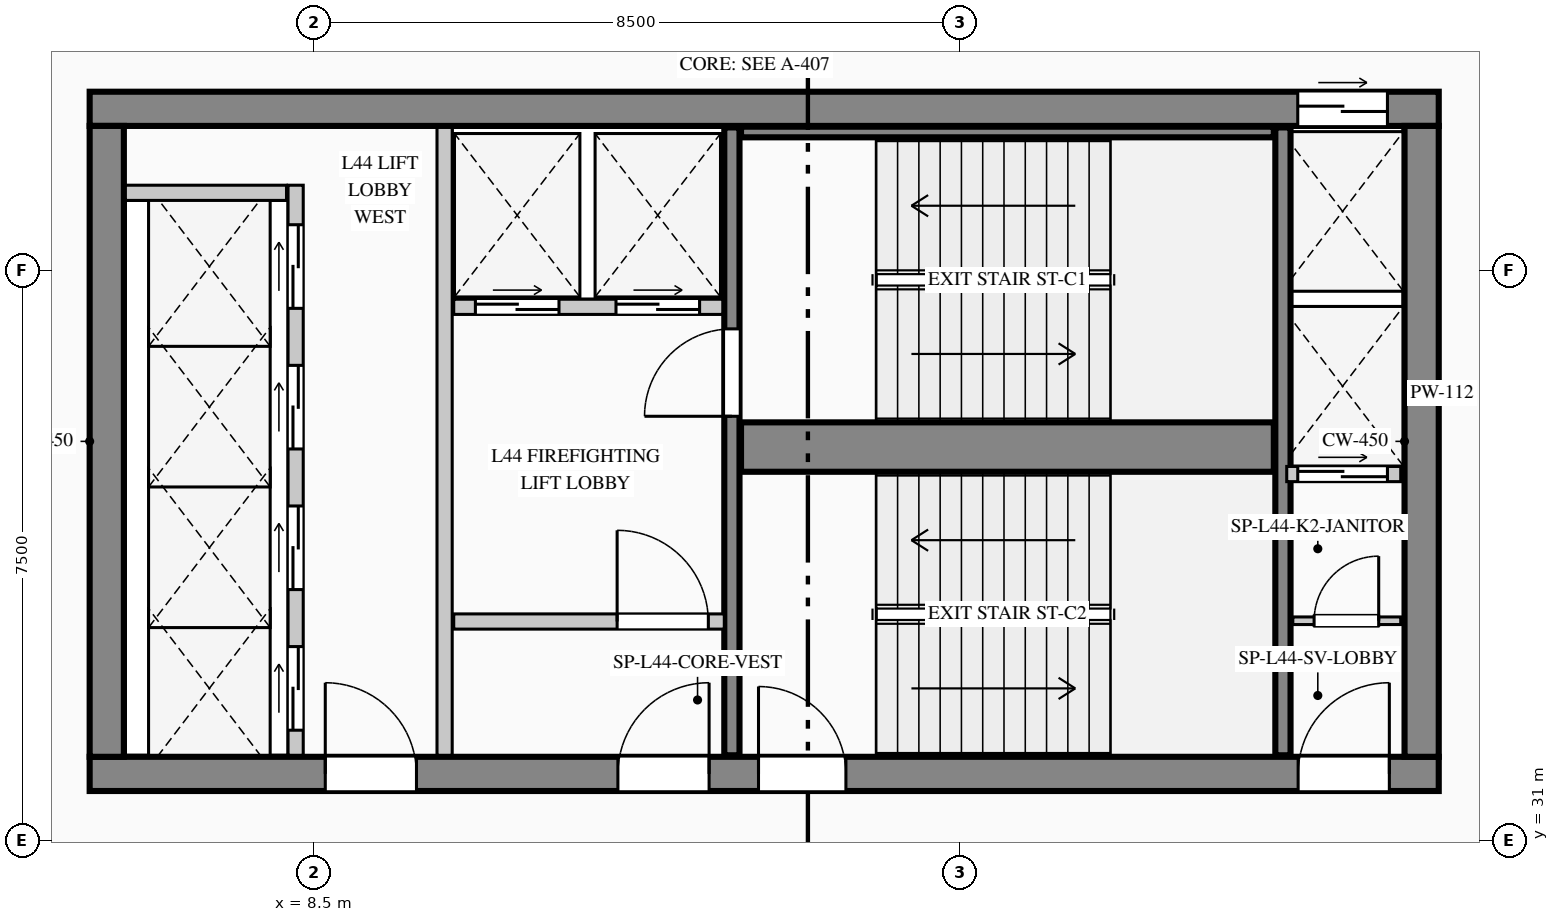
"""IFC4 building model, lengths in metres.
Left out: names, types, materials, properties, quantities, classifications, styles, units other than length and angle.
Written with IfcOpenShell. Run it as: python <this file> out.ifc"""

import sys

from ifc_helpers import new_model, si_unit, direction, frame, frame_2d, origin, place, context, subcontext, project, spatial, rectangle, extrude, element, fill, save


model = new_model("IFC4")
c1 = context("Model", 3, precision=1e-05, world=origin(), true_north=direction((0.0, 1.0)))
c2 = subcontext(c1, "Body", "Model", "MODEL_VIEW")
j1 = project(units=[si_unit("LENGTHUNIT", "METRE"), si_unit("PLANEANGLEUNIT", "RADIAN")], contexts=[c1])
p1 = place(None, origin())
s1 = spatial("IfcSite", under=j1, at=p1, CompositionType="ELEMENT")
p2 = place(p1, origin())
s2 = spatial("IfcBuilding", under=s1, at=p2, CompositionType="ELEMENT")
p3 = place(p2, frame((0.0, 0.0, 187.7)))
s3 = spatial("IfcBuildingStorey", under=s2, at=p3, CompositionType="ELEMENT", Elevation=187.7)
p4 = place(p3, frame((5.55, 40.625, 0.0), z_axis=(0.0, 0.0, 1.0), x_axis=(1.0, 0.0, 0.0)))
e1 = element("IfcWall", 1, at=p4, inside=s3, PredefinedType="SHEAR", context=c2, shape_type="SweptSolid", body=[
    extrude(rectangle(XDim=17.75, YDim=0.45, at=frame_2d((8.875, 0.0))), origin(), (0.0, 0.0, 1.0), 3.95),
])
p5 = place(p4, frame((15.895, 0.0, 0.0)))
e2 = element("IfcOpeningElement", 2, at=p5, cuts=e1, PredefinedType="OPENING", context=c2, shape_type="SweptSolid", body=[
    extrude(rectangle(XDim=1.18, YDim=2.25, at=frame_2d((0.59, 1.125))), frame((0.0, 0.235, 0.0), z_axis=(0.0, -1.0, 0.0), x_axis=(1.0, 0.0, 0.0)), (0.0, 0.0, 1.0), 0.47),
])
p6 = place(p3, frame((5.55, 31.875, 0.0), z_axis=(0.0, 0.0, 1.0), x_axis=(1.0, 0.0, 0.0)))
e3 = element("IfcWall", 3, at=p6, inside=s3, PredefinedType="SHEAR", context=c2, shape_type="SweptSolid", body=[
    extrude(rectangle(XDim=17.75, YDim=0.45, at=frame_2d((8.875, 0.0))), origin(), (0.0, 0.0, 1.0), 3.95),
])
p7 = place(p6, frame((3.1, 0.0, 0.0)))
e4 = element("IfcOpeningElement", 4, at=p7, cuts=e3, PredefinedType="OPENING", context=c2, shape_type="SweptSolid", body=[
    extrude(rectangle(XDim=1.2, YDim=2.2, at=frame_2d((0.6, 1.1))), frame((0.0, 0.235, 0.0), z_axis=(0.0, -1.0, 0.0), x_axis=(1.0, 0.0, 0.0)), (0.0, 0.0, 1.0), 0.47),
])
p8 = place(p6, frame((6.95, 0.0, 0.0)))
e5 = element("IfcOpeningElement", 5, at=p8, cuts=e3, PredefinedType="OPENING", context=c2, shape_type="SweptSolid", body=[
    extrude(rectangle(XDim=1.2, YDim=2.2, at=frame_2d((0.6, 1.1))), frame((0.0, 0.235, 0.0), z_axis=(0.0, -1.0, 0.0), x_axis=(1.0, 0.0, 0.0)), (0.0, 0.0, 1.0), 0.47),
])
p9 = place(p6, frame((8.8, 0.0, 0.0)))
e6 = element("IfcOpeningElement", 6, at=p9, cuts=e3, PredefinedType="OPENING", context=c2, shape_type="SweptSolid", body=[
    extrude(rectangle(XDim=1.15, YDim=2.2, at=frame_2d((0.575, 1.1))), frame((0.0, 0.235, 0.0), z_axis=(0.0, -1.0, 0.0), x_axis=(1.0, 0.0, 0.0)), (0.0, 0.0, 1.0), 0.47),
])
p10 = place(p6, frame((15.9, 0.0, 0.0)))
e7 = element("IfcOpeningElement", 7, at=p10, cuts=e3, PredefinedType="OPENING", context=c2, shape_type="SweptSolid", body=[
    extrude(rectangle(XDim=1.2, YDim=2.2, at=frame_2d((0.6, 1.1))), frame((0.0, 0.235, 0.0), z_axis=(0.0, -1.0, 0.0), x_axis=(1.0, 0.0, 0.0)), (0.0, 0.0, 1.0), 0.47),
])
for number, where, z_axis, x_axis in (
    (8, (5.775, 32.1, 0.0), (0.0, 0.0, 1.0), (0.0, 1.0, 0.0)),
    (9, (23.075, 32.1, 0.0), (0.0, 0.0, 1.0), (0.0, 1.0, 0.0)),
):
    element("IfcWall", number, at=place(p3, frame(where, z_axis=z_axis, x_axis=x_axis)), inside=s3, PredefinedType="SHEAR", context=c2, shape_type="SweptSolid", body=[
        extrude(rectangle(XDim=8.3, YDim=0.45, at=frame_2d((4.15, 0.0))), origin(), (0.0, 0.0, 1.0), 3.95),
    ])
p11 = place(p3, frame((14.0, 32.12, 0.0), z_axis=(0.0, 0.0, 1.0), x_axis=(0.0, 1.0, 0.0)))
e10 = element("IfcWall", 10, at=p11, inside=s3, PredefinedType="SHEAR", context=c2, shape_type="SweptSolid", body=[
    extrude(rectangle(XDim=8.26, YDim=0.2, at=frame_2d((4.13, 0.0))), origin(), (0.0, 0.0, 1.0), 3.95),
])
p12 = place(p11, frame((4.46, 0.0, 0.0)))
e11 = element("IfcOpeningElement", 11, at=p12, cuts=e10, PredefinedType="OPENING", context=c2, shape_type="SweptSolid", body=[
    extrude(rectangle(XDim=1.15, YDim=2.2, at=frame_2d((0.575, 1.1))), frame((0.0, 0.11, 0.0), z_axis=(0.0, -1.0, 0.0), x_axis=(1.0, 0.0, 0.0)), (0.0, 0.0, 1.0), 0.22),
])
p13 = place(p3, frame((14.12, 36.175, 0.0), z_axis=(0.0, 0.0, 1.0), x_axis=(1.0, 0.0, 0.0)))
e12 = element("IfcWall", 12, at=p13, inside=s3, PredefinedType="SHEAR", context=c2, shape_type="SweptSolid", body=[
    extrude(rectangle(XDim=7.01, YDim=0.65, at=frame_2d((3.505, 0.0))), origin(), (0.0, 0.0, 1.0), 3.95),
])
p14 = place(p3, frame((21.25, 32.12, 0.0), z_axis=(0.0, 0.0, 1.0), x_axis=(0.0, 1.0, 0.0)))
e13 = element("IfcWall", 13, at=p14, inside=s3, PredefinedType="SHEAR", context=c2, shape_type="SweptSolid", body=[
    extrude(rectangle(XDim=8.26, YDim=0.2, at=frame_2d((4.13, 0.0))), origin(), (0.0, 0.0, 1.0), 3.95),
])
p15 = place(p3, frame((14.12, 40.32, 0.0), z_axis=(0.0, 0.0, 1.0), x_axis=(1.0, 0.0, 0.0)))
e14 = element("IfcWall", 14, at=p15, inside=s3, PredefinedType="SHEAR", context=c2, shape_type="SweptSolid", body=[
    extrude(rectangle(XDim=7.01, YDim=0.14, at=frame_2d((3.505, 0.0))), origin(), (0.0, 0.0, 1.0), 3.95),
])
p16 = place(p3, frame((7.469, 4.63, 0.0), z_axis=(0.0, 0.0, 1.0), x_axis=(-0.123515300309, 0.992342667928, 0.0)))
e15 = element("IfcWall", 15, at=p16, inside=s3, PredefinedType="STANDARD", context=c2, shape_type="SweptSolid", body=[
    extrude(rectangle(XDim=37.024, YDim=0.26, at=frame_2d((18.512, 0.0))), origin(), (0.0, 0.0, 1.0), 3.7),
])
p17 = place(p16, frame((11.978, 0.0, 0.9)))
e16 = element("IfcOpeningElement", 16, at=p17, cuts=e15, PredefinedType="OPENING", context=c2, shape_type="SweptSolid", body=[
    extrude(rectangle(XDim=2.7, YDim=2.1, at=frame_2d((1.35, 1.05))), frame((0.0, 0.14, 0.0), z_axis=(0.0, -1.0, 0.0), x_axis=(1.0, 0.0, 0.0)), (0.0, 0.0, 1.0), 0.28),
])
p18 = place(p3, frame((8.26, 32.12, 0.0), z_axis=(0.0, 0.0, 1.0), x_axis=(0.0, 1.0, 0.0)))
e17 = element("IfcWall", 17, at=p18, inside=s3, PredefinedType="PARTITIONING", context=c2, shape_type="SweptSolid", body=[
    extrude(rectangle(XDim=7.5, YDim=0.2, at=frame_2d((3.75, 0.0))), origin(), (0.0, 0.0, 1.0), 3.7),
])
p19 = place(p18, frame((0.33, 0.0, 0.0)))
e18 = element("IfcOpeningElement", 18, at=p19, cuts=e17, PredefinedType="OPENING", context=c2, shape_type="SweptSolid", body=[
    extrude(rectangle(XDim=1.1, YDim=2.2, at=frame_2d((0.55, 1.1))), frame((0.0, 0.11, 0.0), z_axis=(0.0, -1.0, 0.0), x_axis=(1.0, 0.0, 0.0)), (0.0, 0.0, 1.0), 0.22),
])
p20 = place(p18, frame((2.18, 0.0, 0.0)))
e19 = element("IfcOpeningElement", 19, at=p20, cuts=e17, PredefinedType="OPENING", context=c2, shape_type="SweptSolid", body=[
    extrude(rectangle(XDim=1.1, YDim=2.2, at=frame_2d((0.55, 1.1))), frame((0.0, 0.11, 0.0), z_axis=(0.0, -1.0, 0.0), x_axis=(1.0, 0.0, 0.0)), (0.0, 0.0, 1.0), 0.22),
])
p21 = place(p18, frame((4.03, 0.0, 0.0)))
e20 = element("IfcOpeningElement", 20, at=p21, cuts=e17, PredefinedType="OPENING", context=c2, shape_type="SweptSolid", body=[
    extrude(rectangle(XDim=1.1, YDim=2.2, at=frame_2d((0.55, 1.1))), frame((0.0, 0.11, 0.0), z_axis=(0.0, -1.0, 0.0), x_axis=(1.0, 0.0, 0.0)), (0.0, 0.0, 1.0), 0.22),
])
p22 = place(p18, frame((5.88, 0.0, 0.0)))
e21 = element("IfcOpeningElement", 21, at=p22, cuts=e17, PredefinedType="OPENING", context=c2, shape_type="SweptSolid", body=[
    extrude(rectangle(XDim=1.1, YDim=2.2, at=frame_2d((0.55, 1.1))), frame((0.0, 0.11, 0.0), z_axis=(0.0, -1.0, 0.0), x_axis=(1.0, 0.0, 0.0)), (0.0, 0.0, 1.0), 0.22),
])
p23 = place(p3, frame((6.02, 39.52, 0.0), z_axis=(0.0, 0.0, 1.0), x_axis=(1.0, 0.0, 0.0)))
e22 = element("IfcWall", 22, at=p23, inside=s3, PredefinedType="PARTITIONING", context=c2, shape_type="SweptSolid", body=[
    extrude(rectangle(XDim=2.12, YDim=0.2, at=frame_2d((1.06, 0.0))), origin(), (0.0, 0.0, 1.0), 3.7),
])
p24 = place(p3, frame((10.22, 32.12, 0.0), z_axis=(0.0, 0.0, 1.0), x_axis=(0.0, 1.0, 0.0)))
e23 = element("IfcWall", 23, at=p24, inside=s3, PredefinedType="PARTITIONING", context=c2, shape_type="SweptSolid", body=[
    extrude(rectangle(XDim=8.26, YDim=0.2, at=frame_2d((4.13, 0.0))), origin(), (0.0, 0.0, 1.0), 3.7),
])
p25 = place(p3, frame((10.34, 38.02, 0.0), z_axis=(0.0, 0.0, 1.0), x_axis=(1.0, 0.0, 0.0)))
e24 = element("IfcWall", 24, at=p25, inside=s3, PredefinedType="PARTITIONING", context=c2, shape_type="SweptSolid", body=[
    extrude(rectangle(XDim=3.54, YDim=0.2, at=frame_2d((1.77, 0.0))), origin(), (0.0, 0.0, 1.0), 3.7),
])
p26 = place(p25, frame((0.285, 0.0, 0.0)))
e25 = element("IfcOpeningElement", 25, at=p26, cuts=e24, PredefinedType="OPENING", context=c2, shape_type="SweptSolid", body=[
    extrude(rectangle(XDim=1.1, YDim=2.2, at=frame_2d((0.55, 1.1))), frame((0.0, 0.11, 0.0), z_axis=(0.0, -1.0, 0.0), x_axis=(1.0, 0.0, 0.0)), (0.0, 0.0, 1.0), 0.22),
])
p27 = place(p25, frame((2.135, 0.0, 0.0)))
e26 = element("IfcOpeningElement", 26, at=p27, cuts=e24, PredefinedType="OPENING", context=c2, shape_type="SweptSolid", body=[
    extrude(rectangle(XDim=1.1, YDim=2.2, at=frame_2d((0.55, 1.1))), frame((0.0, 0.11, 0.0), z_axis=(0.0, -1.0, 0.0), x_axis=(1.0, 0.0, 0.0)), (0.0, 0.0, 1.0), 0.22),
])
p28 = place(p3, frame((10.34, 33.88, 0.0), z_axis=(0.0, 0.0, 1.0), x_axis=(1.0, 0.0, 0.0)))
e27 = element("IfcWall", 27, at=p28, inside=s3, PredefinedType="PARTITIONING", context=c2, shape_type="SweptSolid", body=[
    extrude(rectangle(XDim=3.56, YDim=0.2, at=frame_2d((1.78, 0.0))), origin(), (0.0, 0.0, 1.0), 3.7),
])
p29 = place(p28, frame((2.15, 0.0, 0.0)))
e28 = element("IfcOpeningElement", 28, at=p29, cuts=e27, PredefinedType="OPENING", context=c2, shape_type="SweptSolid", body=[
    extrude(rectangle(XDim=1.2, YDim=2.2, at=frame_2d((0.6, 1.1))), frame((0.0, 0.11, 0.0), z_axis=(0.0, -1.0, 0.0), x_axis=(1.0, 0.0, 0.0)), (0.0, 0.0, 1.0), 0.22),
])
p30 = place(p3, frame((21.38, 33.89, 0.0), z_axis=(0.0, 0.0, 1.0), x_axis=(1.0, 0.0, 0.0)))
e29 = element("IfcWall", 29, at=p30, inside=s3, PredefinedType="PARTITIONING", context=c2, shape_type="SweptSolid", body=[
    extrude(rectangle(XDim=1.42, YDim=0.1, at=frame_2d((0.71, 0.0))), origin(), (0.0, 0.0, 1.0), 3.7),
])
p31 = place(p30, frame((0.28, 0.0, 0.0)))
e30 = element("IfcOpeningElement", 30, at=p31, cuts=e29, PredefinedType="OPENING", context=c2, shape_type="SweptSolid", body=[
    extrude(rectangle(XDim=0.85, YDim=2.1, at=frame_2d((0.425, 1.05))), frame((0.0, 0.06, 0.0), z_axis=(0.0, -1.0, 0.0), x_axis=(1.0, 0.0, 0.0)), (0.0, 0.0, 1.0), 0.12),
])
p32 = place(p3, frame((21.3, 35.82, 0.0), z_axis=(0.0, 0.0, 1.0), x_axis=(1.0, 0.0, 0.0)))
e31 = element("IfcWall", 31, at=p32, inside=s3, PredefinedType="PARTITIONING", context=c2, shape_type="SweptSolid", body=[
    extrude(rectangle(XDim=1.5, YDim=0.2, at=frame_2d((0.75, 0.0))), origin(), (0.0, 0.0, 1.0), 3.7),
])
p33 = place(p32, frame((0.145, 0.0, 0.0)))
e32 = element("IfcOpeningElement", 32, at=p33, cuts=e31, PredefinedType="OPENING", context=c2, shape_type="SweptSolid", body=[
    extrude(rectangle(XDim=1.18, YDim=2.25, at=frame_2d((0.59, 1.125))), frame((0.0, 0.11, 0.0), z_axis=(0.0, -1.0, 0.0), x_axis=(1.0, 0.0, 0.0)), (0.0, 0.0, 1.0), 0.22),
])
p34 = place(p7, origin())
e33 = element("IfcDoor", 33, at=p34, inside=s3, OperationType="SINGLE_SWING_LEFT", PredefinedType="DOOR", context=c2, shape_type="SweptSolid", body=[
    extrude(rectangle(XDim=1.2, YDim=2.2, at=frame_2d((0.6, 1.1))), frame((0.0, 0.025, 0.0), z_axis=(0.0, -1.0, 0.0), x_axis=(1.0, 0.0, 0.0)), (0.0, 0.0, 1.0), 0.05),
])
fill(e4, e33)
p35 = place(p8, origin())
e34 = element("IfcDoor", 34, at=p35, inside=s3, OperationType="SINGLE_SWING_RIGHT", PredefinedType="DOOR", context=c2, shape_type="SweptSolid", body=[
    extrude(rectangle(XDim=1.2, YDim=2.2, at=frame_2d((0.6, 1.1))), frame((0.0, 0.025, 0.0), z_axis=(0.0, -1.0, 0.0), x_axis=(1.0, 0.0, 0.0)), (0.0, 0.0, 1.0), 0.05),
])
fill(e5, e34)
p36 = place(p9, origin())
e35 = element("IfcDoor", 35, at=p36, inside=s3, OperationType="SINGLE_SWING_LEFT", PredefinedType="DOOR", context=c2, shape_type="SweptSolid", body=[
    extrude(rectangle(XDim=1.15, YDim=2.2, at=frame_2d((0.575, 1.1))), frame((0.0, 0.025, 0.0), z_axis=(0.0, -1.0, 0.0), x_axis=(1.0, 0.0, 0.0)), (0.0, 0.0, 1.0), 0.05),
])
fill(e6, e35)
p37 = place(p10, origin())
e36 = element("IfcDoor", 36, at=p37, inside=s3, OperationType="SINGLE_SWING_RIGHT", PredefinedType="DOOR", context=c2, shape_type="SweptSolid", body=[
    extrude(rectangle(XDim=1.2, YDim=2.2, at=frame_2d((0.6, 1.1))), frame((0.0, 0.025, 0.0), z_axis=(0.0, -1.0, 0.0), x_axis=(1.0, 0.0, 0.0)), (0.0, 0.0, 1.0), 0.05),
])
fill(e7, e36)
p38 = place(p29, origin())
e37 = element("IfcDoor", 37, at=p38, inside=s3, OperationType="SINGLE_SWING_LEFT", PredefinedType="DOOR", context=c2, shape_type="SweptSolid", body=[
    extrude(rectangle(XDim=1.2, YDim=2.2, at=frame_2d((0.6, 1.1))), frame((0.0, 0.025, 0.0), z_axis=(0.0, -1.0, 0.0), x_axis=(1.0, 0.0, 0.0)), (0.0, 0.0, 1.0), 0.05),
])
fill(e28, e37)
p39 = place(p31, origin())
e38 = element("IfcDoor", 38, at=p39, inside=s3, OperationType="SINGLE_SWING_RIGHT", PredefinedType="DOOR", context=c2, shape_type="SweptSolid", body=[
    extrude(rectangle(XDim=0.85, YDim=2.1, at=frame_2d((0.425, 1.05))), frame((0.0, 0.025, 0.0), z_axis=(0.0, -1.0, 0.0), x_axis=(1.0, 0.0, 0.0)), (0.0, 0.0, 1.0), 0.05),
])
fill(e30, e38)
p40 = place(p12, origin())
e39 = element("IfcDoor", 39, at=p40, inside=s3, OperationType="SINGLE_SWING_LEFT", PredefinedType="DOOR", context=c2, shape_type="SweptSolid", body=[
    extrude(rectangle(XDim=1.15, YDim=2.2, at=frame_2d((0.575, 1.1))), frame((0.0, 0.025, 0.0), z_axis=(0.0, -1.0, 0.0), x_axis=(1.0, 0.0, 0.0)), (0.0, 0.0, 1.0), 0.05),
])
fill(e11, e39)
p41 = place(p19, origin())
e40 = element("IfcDoor", 40, at=p41, inside=s3, OperationType="DOUBLE_DOOR_SLIDING", PredefinedType="DOOR", context=c2, shape_type="SweptSolid", body=[
    extrude(rectangle(XDim=1.1, YDim=2.2, at=frame_2d((0.55, 1.1))), frame((0.0, 0.025, 0.0), z_axis=(0.0, -1.0, 0.0), x_axis=(1.0, 0.0, 0.0)), (0.0, 0.0, 1.0), 0.05),
])
fill(e18, e40)
p42 = place(p20, origin())
e41 = element("IfcDoor", 41, at=p42, inside=s3, OperationType="DOUBLE_DOOR_SLIDING", PredefinedType="DOOR", context=c2, shape_type="SweptSolid", body=[
    extrude(rectangle(XDim=1.1, YDim=2.2, at=frame_2d((0.55, 1.1))), frame((0.0, 0.025, 0.0), z_axis=(0.0, -1.0, 0.0), x_axis=(1.0, 0.0, 0.0)), (0.0, 0.0, 1.0), 0.05),
])
fill(e19, e41)
p43 = place(p21, origin())
e42 = element("IfcDoor", 42, at=p43, inside=s3, OperationType="DOUBLE_DOOR_SLIDING", PredefinedType="DOOR", context=c2, shape_type="SweptSolid", body=[
    extrude(rectangle(XDim=1.1, YDim=2.2, at=frame_2d((0.55, 1.1))), frame((0.0, 0.025, 0.0), z_axis=(0.0, -1.0, 0.0), x_axis=(1.0, 0.0, 0.0)), (0.0, 0.0, 1.0), 0.05),
])
fill(e20, e42)
p44 = place(p22, origin())
e43 = element("IfcDoor", 43, at=p44, inside=s3, OperationType="DOUBLE_DOOR_SLIDING", PredefinedType="DOOR", context=c2, shape_type="SweptSolid", body=[
    extrude(rectangle(XDim=1.1, YDim=2.2, at=frame_2d((0.55, 1.1))), frame((0.0, 0.025, 0.0), z_axis=(0.0, -1.0, 0.0), x_axis=(1.0, 0.0, 0.0)), (0.0, 0.0, 1.0), 0.05),
])
fill(e21, e43)
p45 = place(p26, origin())
e44 = element("IfcDoor", 44, at=p45, inside=s3, OperationType="DOUBLE_DOOR_SLIDING", PredefinedType="DOOR", context=c2, shape_type="SweptSolid", body=[
    extrude(rectangle(XDim=1.1, YDim=2.2, at=frame_2d((0.55, 1.1))), frame((0.0, 0.025, 0.0), z_axis=(0.0, -1.0, 0.0), x_axis=(1.0, 0.0, 0.0)), (0.0, 0.0, 1.0), 0.05),
])
fill(e25, e44)
p46 = place(p27, origin())
e45 = element("IfcDoor", 45, at=p46, inside=s3, OperationType="DOUBLE_DOOR_SLIDING", PredefinedType="DOOR", context=c2, shape_type="SweptSolid", body=[
    extrude(rectangle(XDim=1.1, YDim=2.2, at=frame_2d((0.55, 1.1))), frame((0.0, 0.025, 0.0), z_axis=(0.0, -1.0, 0.0), x_axis=(1.0, 0.0, 0.0)), (0.0, 0.0, 1.0), 0.05),
])
fill(e26, e45)
p47 = place(p5, origin())
e46 = element("IfcDoor", 46, at=p47, inside=s3, OperationType="DOUBLE_DOOR_SLIDING", PredefinedType="DOOR", context=c2, shape_type="SweptSolid", body=[
    extrude(rectangle(XDim=1.18, YDim=2.25, at=frame_2d((0.59, 1.125))), frame((0.0, 0.025, 0.0), z_axis=(0.0, -1.0, 0.0), x_axis=(1.0, 0.0, 0.0)), (0.0, 0.0, 1.0), 0.05),
])
fill(e2, e46)
p48 = place(p33, origin())
e47 = element("IfcDoor", 47, at=p48, inside=s3, OperationType="DOUBLE_DOOR_SLIDING", PredefinedType="DOOR", context=c2, shape_type="SweptSolid", body=[
    extrude(rectangle(XDim=1.18, YDim=2.25, at=frame_2d((0.59, 1.125))), frame((0.0, 0.025, 0.0), z_axis=(0.0, -1.0, 0.0), x_axis=(1.0, 0.0, 0.0)), (0.0, 0.0, 1.0), 0.05),
])
fill(e32, e47)
save(model, sys.argv[1])
